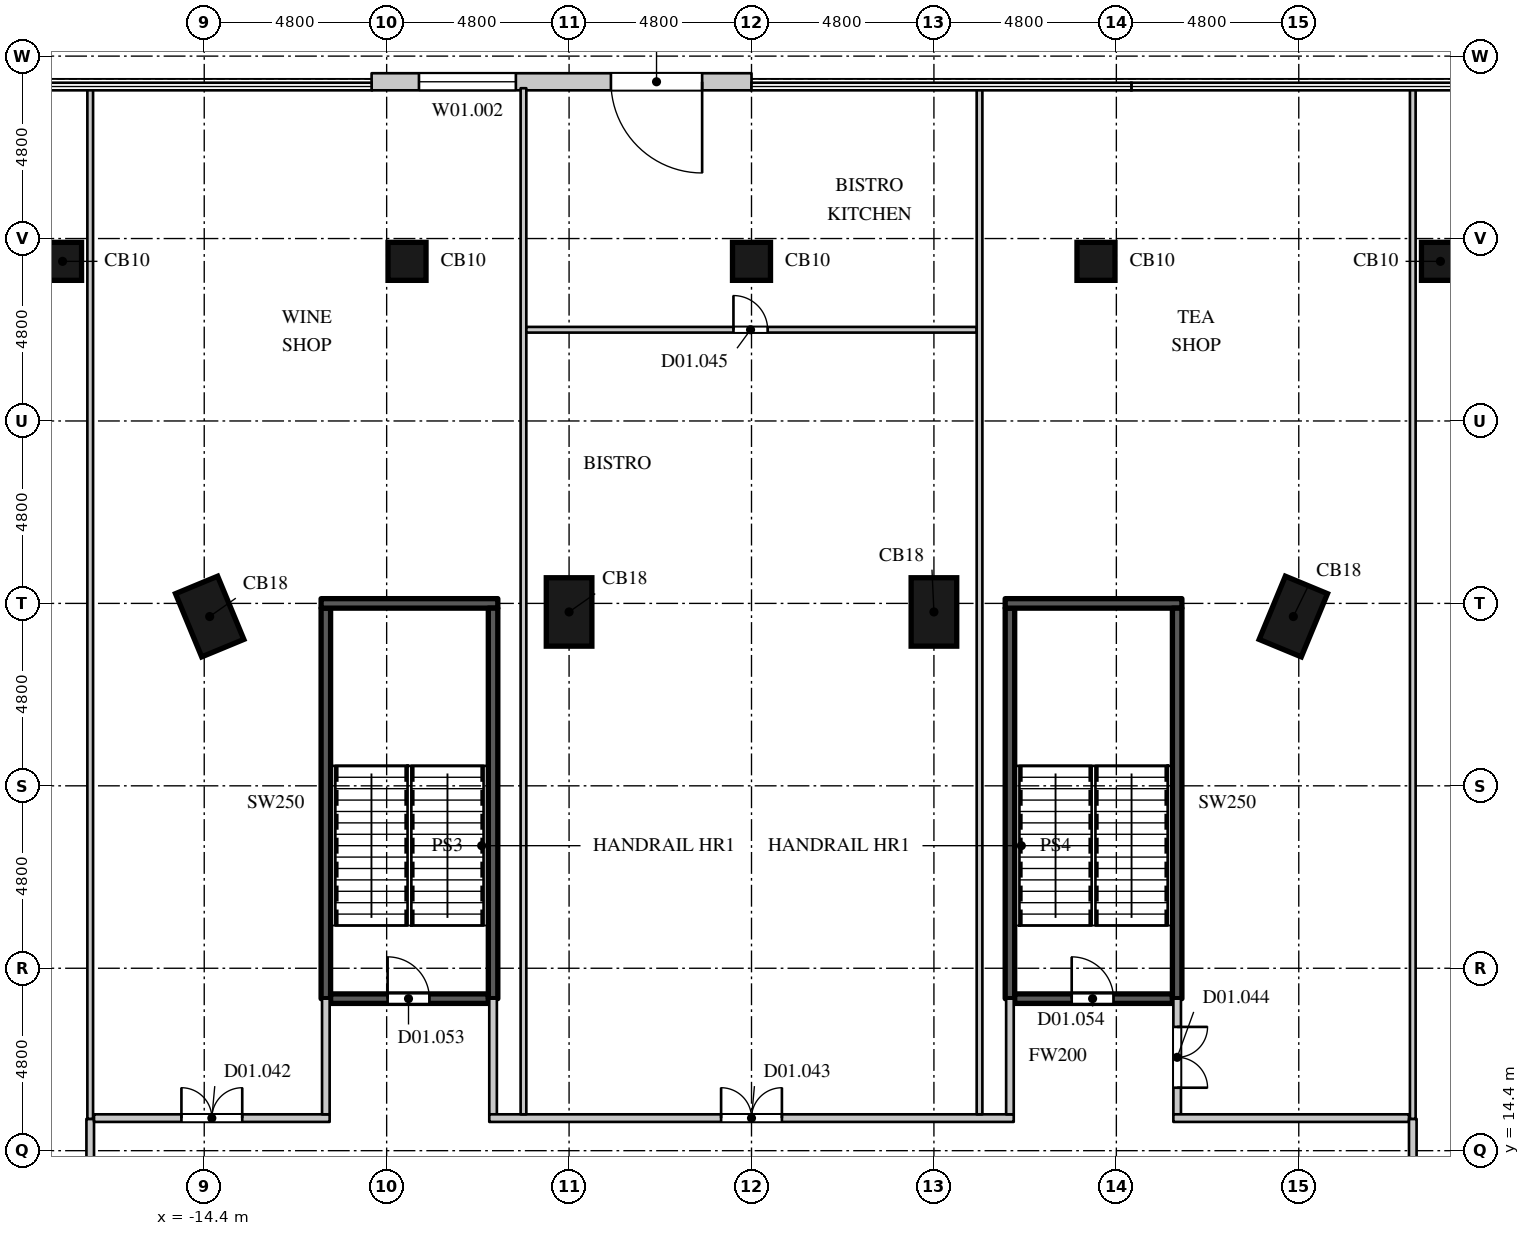
"""IFC4 building model, lengths in metres.
Left out: names, types, materials, properties, quantities, classifications, styles, units other than length and angle.
Written with IfcOpenShell. Run it as: python <this file> out.ifc"""

import sys

from ifc_helpers import new_model, si_unit, direction, frame, frame_2d, origin, origin_2d, place, context, subcontext, project, spatial, rectangle, extrude, element, fill, save


model = new_model("IFC4")
c1 = context("Model", 3, precision=1e-05, world=origin(), true_north=direction((0.0, 1.0)))
c2 = subcontext(c1, "Body", "Model", "MODEL_VIEW")
j1 = project(units=[si_unit("LENGTHUNIT", "METRE"), si_unit("PLANEANGLEUNIT", "RADIAN")], contexts=[c1])
p1 = place(None, origin())
s1 = spatial("IfcSite", under=j1, at=p1, CompositionType="ELEMENT")
p2 = place(p1, origin())
s2 = spatial("IfcBuilding", under=s1, at=p2, CompositionType="ELEMENT")
p3 = place(p2, frame((0.0, 0.0, 6.0)))
s3 = spatial("IfcBuildingStorey", under=s2, at=p3, CompositionType="ELEMENT", Elevation=6.0)
for number, where, z_axis, x_axis in (
    (1, (-14.257, 28.454, 0.0), (0.0, 0.0, 1.0), (-0.924, -0.383, 0.0)),
    (2, (14.257, 28.454, 0.0), (0.0, 0.0, 1.0), (-0.924, 0.383, 0.0)),
    (3, (-4.8, 28.575, 0.0), (0.0, 0.0, 1.0), (-1.0, 0.0, 0.0)),
    (4, (4.8, 28.575, 0.0), (0.0, 0.0, 1.0), (-1.0, 0.0, 0.0)),
):
    element("IfcColumn", number, at=place(p3, frame(where, z_axis=z_axis, x_axis=x_axis)), inside=s3, PredefinedType="COLUMN", context=c2, shape_type="SweptSolid", body=[
        extrude(rectangle(XDim=1.2, YDim=1.8, at=origin_2d()), origin(), (0.0, 0.0, 1.0), 5.0),
    ])
for number, where, z_axis, x_axis in (
    (5, (-18.128, 37.8, 0.0), (0.0, 0.0, 1.0), (1.0, 0.0, 0.0)),
    (6, (-9.064, 37.8, 0.0), (0.0, 0.0, 1.0), (1.0, 0.0, 0.0)),
    (7, (0.0, 37.8, 0.0), (0.0, 0.0, 1.0), (1.0, 0.0, 0.0)),
    (8, (9.064, 37.8, 0.0), (0.0, 0.0, 1.0), (1.0, 0.0, 0.0)),
    (9, (18.128, 37.8, 0.0), (0.0, 0.0, 1.0), (1.0, 0.0, 0.0)),
):
    element("IfcColumn", number, at=place(p3, frame(where, z_axis=z_axis, x_axis=x_axis)), inside=s3, PredefinedType="COLUMN", context=c2, shape_type="SweptSolid", body=[
        extrude(rectangle(XDim=1.0, YDim=1.0, at=origin_2d()), origin(), (0.0, 0.0, 1.0), 5.0),
    ])
p4 = place(p3, frame((0.0, 42.525, 0.0), z_axis=(0.0, 0.0, 1.0), x_axis=(-1.0, 0.0, 0.0)))
e10 = element("IfcWall", 10, at=p4, inside=s3, PredefinedType="ELEMENTEDWALL", context=c2, shape_type="SweptSolid", body=[
    extrude(rectangle(XDim=9.996, YDim=0.45, at=frame_2d((4.998, 0.0))), origin(), (0.0, 0.0, 1.0), 4.7),
])
p5 = place(p4, frame((1.299, 0.0, 0.0)))
e11 = element("IfcOpeningElement", 11, at=p5, cuts=e10, PredefinedType="OPENING", context=c2, shape_type="SweptSolid", body=[
    extrude(rectangle(XDim=2.4, YDim=2.7, at=frame_2d((1.2, 1.35))), frame((0.0, 0.235, 0.0), z_axis=(0.0, -1.0, 0.0), x_axis=(1.0, 0.0, 0.0)), (0.0, 0.0, 1.0), 0.47),
])
p6 = place(p4, frame((6.2, 0.0, 1.05)))
e12 = element("IfcOpeningElement", 12, at=p6, cuts=e10, PredefinedType="OPENING", context=c2, shape_type="SweptSolid", body=[
    extrude(rectangle(XDim=2.55, YDim=2.7, at=frame_2d((1.275, 1.35))), frame((0.0, 0.235, 0.0), z_axis=(0.0, -1.0, 0.0), x_axis=(1.0, 0.0, 0.0)), (0.0, 0.0, 1.0), 0.47),
])
p7 = place(p3, frame((-17.4, 11.3, 0.0), z_axis=(0.0, 0.0, 1.0), x_axis=(0.0, 1.0, 0.0)))
e13 = element("IfcWall", 13, at=p7, inside=s3, PredefinedType="PARTITIONING", context=c2, shape_type="SweptSolid", body=[
    extrude(rectangle(XDim=3.937, YDim=0.2, at=frame_2d((1.968, 0.0))), origin(), (0.0, 0.0, 1.0), 4.4),
])
p8 = place(p7, frame((1.05, 0.0, 0.0)))
e14 = element("IfcOpeningElement", 14, at=p8, cuts=e13, PredefinedType="OPENING", context=c2, shape_type="SweptSolid", body=[
    extrude(rectangle(XDim=1.8, YDim=2.4, at=frame_2d((0.9, 1.2))), frame((0.0, 0.11, 0.0), z_axis=(0.0, -1.0, 0.0), x_axis=(1.0, 0.0, 0.0)), (0.0, 0.0, 1.0), 0.22),
])
p9 = place(p3, frame((-17.3, 15.257, 0.0), z_axis=(0.0, 0.0, 1.0), x_axis=(1.0, 0.0, 0.0)))
e15 = element("IfcWall", 15, at=p9, inside=s3, PredefinedType="PARTITIONING", context=c2, shape_type="SweptSolid", body=[
    extrude(rectangle(XDim=6.2, YDim=0.2, at=frame_2d((3.1, 0.0))), origin(), (0.0, 0.0, 1.0), 4.4),
])
p10 = place(p9, frame((2.3, 0.0, 0.0)))
e16 = element("IfcOpeningElement", 16, at=p10, cuts=e15, PredefinedType="OPENING", context=c2, shape_type="SweptSolid", body=[
    extrude(rectangle(XDim=1.6, YDim=2.4, at=frame_2d((0.8, 1.2))), frame((0.0, 0.11, 0.0), z_axis=(0.0, -1.0, 0.0), x_axis=(1.0, 0.0, 0.0)), (0.0, 0.0, 1.0), 0.22),
])
for number, where, z_axis, x_axis in (
    (17, (-11.2, 15.357, 0.0), (0.0, 0.0, 1.0), (0.0, 1.0, 0.0)),
    (18, (-6.8, 15.357, 0.0), (0.0, 0.0, 1.0), (0.0, 1.0, 0.0)),
):
    element("IfcWall", number, at=place(p3, frame(where, z_axis=z_axis, x_axis=x_axis)), inside=s3, PredefinedType="PARTITIONING", context=c2, shape_type="SweptSolid", body=[
        extrude(rectangle(XDim=3.043, YDim=0.2, at=frame_2d((1.521, 0.0))), origin(), (0.0, 0.0, 1.0), 4.4),
    ])
p11 = place(p3, frame((-6.9, 15.257, 0.0), z_axis=(0.0, 0.0, 1.0), x_axis=(1.0, 0.0, 0.0)))
e19 = element("IfcWall", 19, at=p11, inside=s3, PredefinedType="PARTITIONING", context=c2, shape_type="SweptSolid", body=[
    extrude(rectangle(XDim=13.8, YDim=0.2, at=frame_2d((6.9, 0.0))), origin(), (0.0, 0.0, 1.0), 4.4),
])
p12 = place(p11, frame((6.1, 0.0, 0.0)))
e20 = element("IfcOpeningElement", 20, at=p12, cuts=e19, PredefinedType="OPENING", context=c2, shape_type="SweptSolid", body=[
    extrude(rectangle(XDim=1.6, YDim=2.4, at=frame_2d((0.8, 1.2))), frame((0.0, 0.11, 0.0), z_axis=(0.0, -1.0, 0.0), x_axis=(1.0, 0.0, 0.0)), (0.0, 0.0, 1.0), 0.22),
])
p13 = place(p3, frame((6.8, 15.357, 0.0), z_axis=(0.0, 0.0, 1.0), x_axis=(0.0, 1.0, 0.0)))
e21 = element("IfcWall", 21, at=p13, inside=s3, PredefinedType="PARTITIONING", context=c2, shape_type="SweptSolid", body=[
    extrude(rectangle(XDim=3.043, YDim=0.2, at=frame_2d((1.521, 0.0))), origin(), (0.0, 0.0, 1.0), 4.4),
])
p14 = place(p3, frame((11.2, 15.357, 0.0), z_axis=(0.0, 0.0, 1.0), x_axis=(0.0, 1.0, 0.0)))
e22 = element("IfcWall", 22, at=p14, inside=s3, PredefinedType="PARTITIONING", context=c2, shape_type="SweptSolid", body=[
    extrude(rectangle(XDim=3.043, YDim=0.2, at=frame_2d((1.521, 0.0))), origin(), (0.0, 0.0, 1.0), 4.4),
])
p15 = place(p14, frame((0.7, 0.0, 0.0)))
e23 = element("IfcOpeningElement", 23, at=p15, cuts=e22, PredefinedType="OPENING", context=c2, shape_type="SweptSolid", body=[
    extrude(rectangle(XDim=1.6, YDim=2.4, at=frame_2d((0.8, 1.2))), frame((0.0, 0.11, 0.0), z_axis=(0.0, -1.0, 0.0), x_axis=(1.0, 0.0, 0.0)), (0.0, 0.0, 1.0), 0.22),
])
p16 = place(p3, frame((11.1, 15.257, 0.0), z_axis=(0.0, 0.0, 1.0), x_axis=(1.0, 0.0, 0.0)))
e24 = element("IfcWall", 24, at=p16, inside=s3, PredefinedType="PARTITIONING", context=c2, shape_type="SweptSolid", body=[
    extrude(rectangle(XDim=6.2, YDim=0.2, at=frame_2d((3.1, 0.0))), origin(), (0.0, 0.0, 1.0), 4.4),
])
p17 = place(p3, frame((17.4, 11.3, 0.0), z_axis=(0.0, 0.0, 1.0), x_axis=(0.0, 1.0, 0.0)))
e25 = element("IfcWall", 25, at=p17, inside=s3, PredefinedType="PARTITIONING", context=c2, shape_type="SweptSolid", body=[
    extrude(rectangle(XDim=3.937, YDim=0.2, at=frame_2d((1.968, 0.0))), origin(), (0.0, 0.0, 1.0), 4.4),
])
p18 = place(p17, frame((1.15, 0.0, 0.0)))
e26 = element("IfcOpeningElement", 26, at=p18, cuts=e25, PredefinedType="OPENING", context=c2, shape_type="SweptSolid", body=[
    extrude(rectangle(XDim=1.6, YDim=2.4, at=frame_2d((0.8, 1.2))), frame((0.0, 0.11, 0.0), z_axis=(0.0, -1.0, 0.0), x_axis=(1.0, 0.0, 0.0)), (0.0, 0.0, 1.0), 0.22),
])
p19 = place(p3, frame((-17.4, 15.237, 0.0), z_axis=(0.0, 0.0, 1.0), x_axis=(0.0, 1.0, 0.0)))
e27 = element("IfcWall", 27, at=p19, inside=s3, PredefinedType="PARTITIONING", context=c2, shape_type="SweptSolid", body=[
    extrude(rectangle(XDim=27.118, YDim=0.15, at=frame_2d((13.559, 0.0))), origin(), (0.0, 0.0, 1.0), 4.4),
])
p20 = place(p3, frame((-6.0, 15.357, 0.0), z_axis=(0.0, 0.0, 1.0), x_axis=(0.0, 1.0, 0.0)))
e28 = element("IfcWall", 28, at=p20, inside=s3, PredefinedType="PARTITIONING", context=c2, shape_type="SweptSolid", body=[
    extrude(rectangle(XDim=26.998, YDim=0.15, at=frame_2d((13.499, 0.0))), origin(), (0.0, 0.0, 1.0), 4.4),
])
p21 = place(p3, frame((-5.925, 36.0, 0.0), z_axis=(0.0, 0.0, 1.0), x_axis=(1.0, 0.0, 0.0)))
e29 = element("IfcWall", 29, at=p21, inside=s3, PredefinedType="PARTITIONING", context=c2, shape_type="SweptSolid", body=[
    extrude(rectangle(XDim=11.85, YDim=0.15, at=frame_2d((5.925, 0.0))), origin(), (0.0, 0.0, 1.0), 4.4),
])
p22 = place(p21, frame((5.45, 0.0, 0.0)))
e30 = element("IfcOpeningElement", 30, at=p22, cuts=e29, PredefinedType="OPENING", context=c2, shape_type="SweptSolid", body=[
    extrude(rectangle(XDim=0.9, YDim=2.2, at=frame_2d((0.45, 1.1))), frame((0.0, 0.085, 0.0), z_axis=(0.0, -1.0, 0.0), x_axis=(1.0, 0.0, 0.0)), (0.0, 0.0, 1.0), 0.17),
])
p23 = place(p3, frame((6.0, 15.357, 0.0), z_axis=(0.0, 0.0, 1.0), x_axis=(0.0, 1.0, 0.0)))
e31 = element("IfcWall", 31, at=p23, inside=s3, PredefinedType="PARTITIONING", context=c2, shape_type="SweptSolid", body=[
    extrude(rectangle(XDim=26.998, YDim=0.15, at=frame_2d((13.499, 0.0))), origin(), (0.0, 0.0, 1.0), 4.4),
])
p24 = place(p3, frame((17.4, 15.237, 0.0), z_axis=(0.0, 0.0, 1.0), x_axis=(0.0, 1.0, 0.0)))
e32 = element("IfcWall", 32, at=p24, inside=s3, PredefinedType="PARTITIONING", context=c2, shape_type="SweptSolid", body=[
    extrude(rectangle(XDim=27.118, YDim=0.15, at=frame_2d((13.559, 0.0))), origin(), (0.0, 0.0, 1.0), 4.4),
])
p25 = place(p3, frame((-11.2, 18.4, 0.0), z_axis=(0.0, 0.0, 1.0), x_axis=(0.0, 1.0, 0.0)))
e33 = element("IfcWall", 33, at=p25, inside=s3, PredefinedType="SHEAR", context=c2, shape_type="SweptSolid", body=[
    extrude(rectangle(XDim=10.275, YDim=0.25, at=frame_2d((5.138, 0.0))), origin(), (0.0, 0.0, 1.0), 4.65),
])
p26 = place(p3, frame((-11.075, 18.4, 0.0), z_axis=(0.0, 0.0, 1.0), x_axis=(1.0, 0.0, 0.0)))
e34 = element("IfcWall", 34, at=p26, inside=s3, PredefinedType="SHEAR", context=c2, shape_type="SweptSolid", body=[
    extrude(rectangle(XDim=4.15, YDim=0.25, at=frame_2d((2.075, 0.0))), origin(), (0.0, 0.0, 1.0), 4.65),
])
p27 = place(p26, frame((1.5, 0.0, 0.0)))
e35 = element("IfcOpeningElement", 35, at=p27, cuts=e34, PredefinedType="OPENING", context=c2, shape_type="SweptSolid", body=[
    extrude(rectangle(XDim=1.1, YDim=2.2, at=frame_2d((0.55, 1.1))), frame((0.0, 0.135, 0.0), z_axis=(0.0, -1.0, 0.0), x_axis=(1.0, 0.0, 0.0)), (0.0, 0.0, 1.0), 0.27),
])
p28 = place(p3, frame((-11.325, 28.8, 0.0), z_axis=(0.0, 0.0, 1.0), x_axis=(1.0, 0.0, 0.0)))
e36 = element("IfcWall", 36, at=p28, inside=s3, PredefinedType="SHEAR", context=c2, shape_type="SweptSolid", body=[
    extrude(rectangle(XDim=4.65, YDim=0.25, at=frame_2d((2.325, 0.0))), origin(), (0.0, 0.0, 1.0), 4.65),
])
for number, where, z_axis, x_axis in (
    (37, (-6.8, 18.4, 0.0), (0.0, 0.0, 1.0), (0.0, 1.0, 0.0)),
    (38, (6.8, 18.4, 0.0), (0.0, 0.0, 1.0), (0.0, 1.0, 0.0)),
):
    element("IfcWall", number, at=place(p3, frame(where, z_axis=z_axis, x_axis=x_axis)), inside=s3, PredefinedType="SHEAR", context=c2, shape_type="SweptSolid", body=[
        extrude(rectangle(XDim=10.275, YDim=0.25, at=frame_2d((5.138, 0.0))), origin(), (0.0, 0.0, 1.0), 4.65),
    ])
p29 = place(p3, frame((6.925, 18.4, 0.0), z_axis=(0.0, 0.0, 1.0), x_axis=(1.0, 0.0, 0.0)))
e39 = element("IfcWall", 39, at=p29, inside=s3, PredefinedType="SHEAR", context=c2, shape_type="SweptSolid", body=[
    extrude(rectangle(XDim=4.15, YDim=0.25, at=frame_2d((2.075, 0.0))), origin(), (0.0, 0.0, 1.0), 4.65),
])
p30 = place(p29, frame((1.5, 0.0, 0.0)))
e40 = element("IfcOpeningElement", 40, at=p30, cuts=e39, PredefinedType="OPENING", context=c2, shape_type="SweptSolid", body=[
    extrude(rectangle(XDim=1.1, YDim=2.2, at=frame_2d((0.55, 1.1))), frame((0.0, 0.135, 0.0), z_axis=(0.0, -1.0, 0.0), x_axis=(1.0, 0.0, 0.0)), (0.0, 0.0, 1.0), 0.27),
])
p31 = place(p3, frame((6.675, 28.8, 0.0), z_axis=(0.0, 0.0, 1.0), x_axis=(1.0, 0.0, 0.0)))
e41 = element("IfcWall", 41, at=p31, inside=s3, PredefinedType="SHEAR", context=c2, shape_type="SweptSolid", body=[
    extrude(rectangle(XDim=4.65, YDim=0.25, at=frame_2d((2.325, 0.0))), origin(), (0.0, 0.0, 1.0), 4.65),
])
p32 = place(p3, frame((11.2, 18.4, 0.0), z_axis=(0.0, 0.0, 1.0), x_axis=(0.0, 1.0, 0.0)))
e42 = element("IfcWall", 42, at=p32, inside=s3, PredefinedType="SHEAR", context=c2, shape_type="SweptSolid", body=[
    extrude(rectangle(XDim=10.275, YDim=0.25, at=frame_2d((5.138, 0.0))), origin(), (0.0, 0.0, 1.0), 4.65),
])
p33 = place(p5, origin())
e43 = element("IfcDoor", 43, at=p33, inside=s3, OperationType="SINGLE_SWING_LEFT", PredefinedType="DOOR", context=c2, shape_type="SweptSolid", body=[
    extrude(rectangle(XDim=2.4, YDim=2.7, at=frame_2d((1.2, 1.35))), frame((0.0, 0.13, 0.0), z_axis=(0.0, -1.0, 0.0), x_axis=(1.0, 0.0, 0.0)), (0.0, 0.0, 1.0), 0.05),
])
fill(e11, e43)
p34 = place(p6, origin())
e44 = element("IfcWindow", 44, at=p34, inside=s3, PartitioningType="SINGLE_PANEL", PredefinedType="WINDOW", context=c2, shape_type="SweptSolid", body=[
    extrude(rectangle(XDim=2.55, YDim=2.7, at=frame_2d((1.275, 1.35))), frame((0.0, 0.135, 0.0), z_axis=(0.0, -1.0, 0.0), x_axis=(1.0, 0.0, 0.0)), (0.0, 0.0, 1.0), 0.06),
])
fill(e12, e44)
p35 = place(p10, origin())
e45 = element("IfcDoor", 45, at=p35, inside=s3, OperationType="DOUBLE_DOOR_SINGLE_SWING", PredefinedType="DOOR", context=c2, shape_type="SweptSolid", body=[
    extrude(rectangle(XDim=1.6, YDim=2.4, at=frame_2d((0.8, 1.2))), frame((0.0, 0.025, 0.0), z_axis=(0.0, -1.0, 0.0), x_axis=(1.0, 0.0, 0.0)), (0.0, 0.0, 1.0), 0.05),
])
fill(e16, e45)
p36 = place(p12, origin())
e46 = element("IfcDoor", 46, at=p36, inside=s3, OperationType="DOUBLE_DOOR_SINGLE_SWING", PredefinedType="DOOR", context=c2, shape_type="SweptSolid", body=[
    extrude(rectangle(XDim=1.6, YDim=2.4, at=frame_2d((0.8, 1.2))), frame((0.0, 0.025, 0.0), z_axis=(0.0, -1.0, 0.0), x_axis=(1.0, 0.0, 0.0)), (0.0, 0.0, 1.0), 0.05),
])
fill(e20, e46)
p37 = place(p15, origin())
e47 = element("IfcDoor", 47, at=p37, inside=s3, OperationType="DOUBLE_DOOR_SINGLE_SWING", PredefinedType="DOOR", context=c2, shape_type="SweptSolid", body=[
    extrude(rectangle(XDim=1.6, YDim=2.4, at=frame_2d((0.8, 1.2))), frame((0.0, 0.025, 0.0), z_axis=(0.0, -1.0, 0.0), x_axis=(1.0, 0.0, 0.0)), (0.0, 0.0, 1.0), 0.05),
])
fill(e23, e47)
p38 = place(p22, origin())
e48 = element("IfcDoor", 48, at=p38, inside=s3, OperationType="SINGLE_SWING_LEFT", PredefinedType="DOOR", context=c2, shape_type="SweptSolid", body=[
    extrude(rectangle(XDim=0.9, YDim=2.2, at=frame_2d((0.45, 1.1))), frame((0.0, 0.025, 0.0), z_axis=(0.0, -1.0, 0.0), x_axis=(1.0, 0.0, 0.0)), (0.0, 0.0, 1.0), 0.05),
])
fill(e30, e48)
p39 = place(p27, origin())
e49 = element("IfcDoor", 49, at=p39, inside=s3, OperationType="SINGLE_SWING_LEFT", PredefinedType="DOOR", context=c2, shape_type="SweptSolid", body=[
    extrude(rectangle(XDim=1.1, YDim=2.2, at=frame_2d((0.55, 1.1))), frame((0.0, 0.025, 0.0), z_axis=(0.0, -1.0, 0.0), x_axis=(1.0, 0.0, 0.0)), (0.0, 0.0, 1.0), 0.05),
])
fill(e35, e49)
p40 = place(p30, origin())
e50 = element("IfcDoor", 50, at=p40, inside=s3, OperationType="SINGLE_SWING_LEFT", PredefinedType="DOOR", context=c2, shape_type="SweptSolid", body=[
    extrude(rectangle(XDim=1.1, YDim=2.2, at=frame_2d((0.55, 1.1))), frame((0.0, 0.025, 0.0), z_axis=(0.0, -1.0, 0.0), x_axis=(1.0, 0.0, 0.0)), (0.0, 0.0, 1.0), 0.05),
])
fill(e40, e50)
save(model, sys.argv[1])
